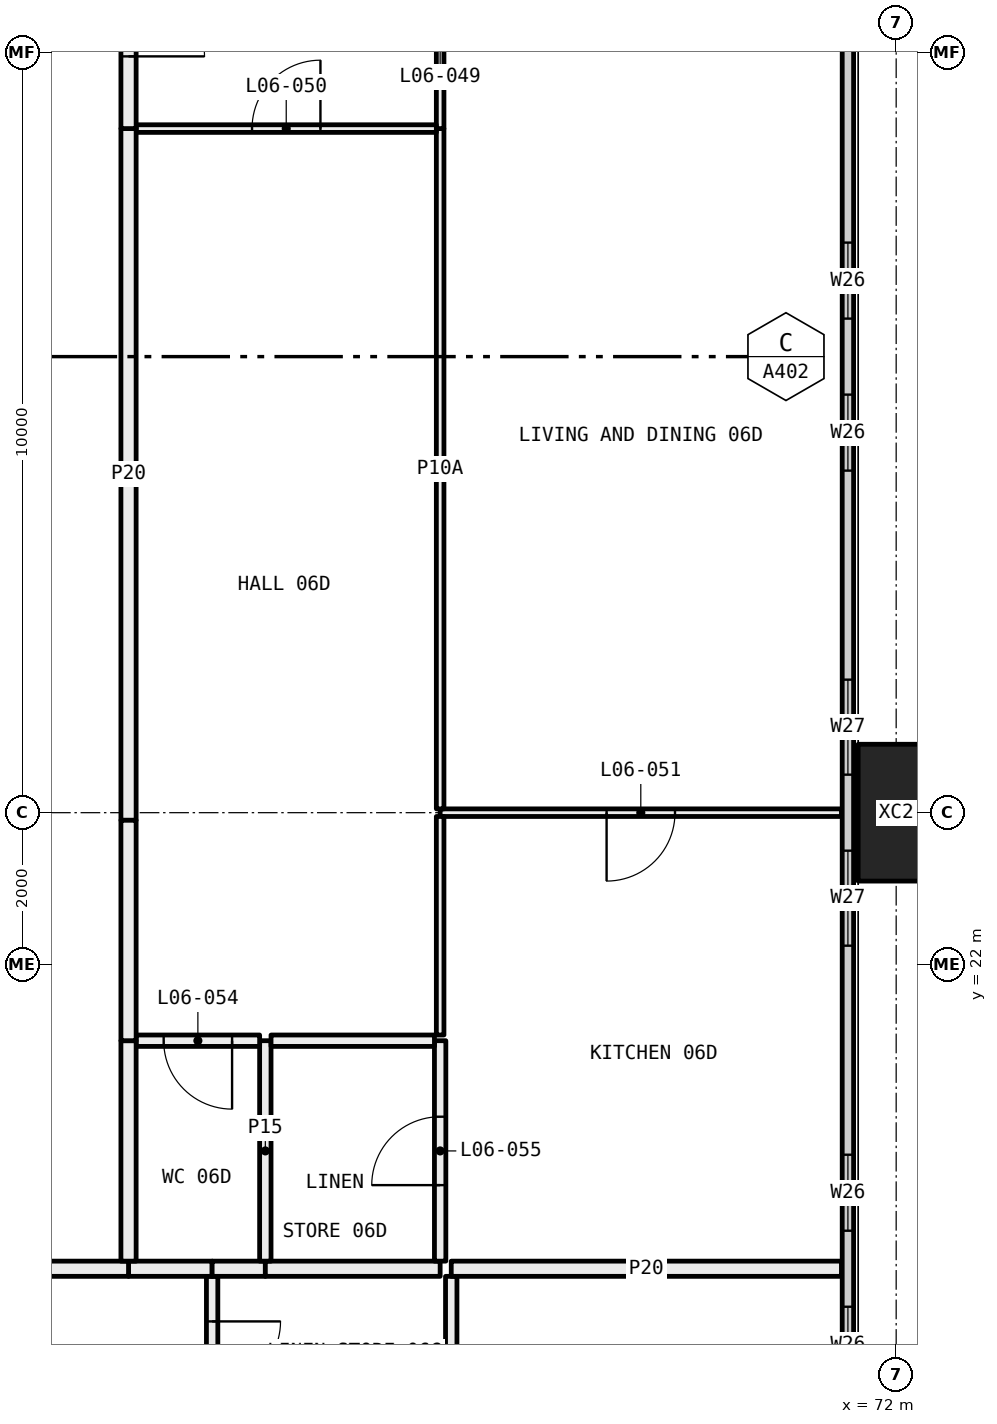
"""IFC4 building model, lengths in metres.
Left out: names, types, materials, properties, quantities, classifications, styles, units other than length and angle.
Written with IfcOpenShell. Run it as: python <this file> out.ifc"""

import sys

from ifc_helpers import new_model, si_unit, direction, frame, frame_2d, origin, origin_2d, place, context, subcontext, project, spatial, rectangle, hollow_rectangle, extrude, element, fill, save


model = new_model("IFC4")
c1 = context("Model", 3, precision=1e-05, world=origin(), true_north=direction((0.0, 1.0)))
c2 = subcontext(c1, "Body", "Model", "MODEL_VIEW")
j1 = project(units=[si_unit("LENGTHUNIT", "METRE"), si_unit("PLANEANGLEUNIT", "RADIAN")], contexts=[c1])
p1 = place(None, origin())
s1 = spatial("IfcSite", under=j1, at=p1, CompositionType="ELEMENT")
p2 = place(p1, origin())
s2 = spatial("IfcBuilding", under=s1, at=p2, CompositionType="ELEMENT")
p3 = place(p2, frame((0.0, 0.0, 33.45)))
s3 = spatial("IfcBuildingStorey", under=s2, at=p3, CompositionType="ELEMENT", Elevation=33.45)
p4 = place(p3, frame((72.0, 24.0, -0.4), z_axis=(0.0, 0.0, 1.0), x_axis=(0.0, 1.0, 0.0)))
e1 = element("IfcColumn", 1, at=p4, inside=s3, PredefinedType="COLUMN", context=c2, shape_type="SweptSolid", body=[
    extrude(hollow_rectangle(XDim=1.8, YDim=1.0, WallThickness=0.07, at=origin_2d()), origin(), (0.0, 0.0, 1.0), 3.45),
])
p5 = place(p3, frame((71.365, 6.71, 0.0), z_axis=(0.0, 0.0, 1.0), x_axis=(0.0, 1.0, 0.0)))
e2 = element("IfcWall", 2, at=p5, inside=s3, PredefinedType="ELEMENTEDWALL", context=c2, shape_type="SweptSolid", body=[
    extrude(rectangle(XDim=34.58, YDim=0.15, at=frame_2d((17.29, 0.0))), origin(), (0.0, 0.0, 1.0), 3.05),
])
p6 = place(p5, frame((0.29, 0.0, 0.45)))
e3 = element("IfcOpeningElement", 3, at=p6, cuts=e2, PredefinedType="OPENING", context=c2, shape_type="SweptSolid", body=[
    extrude(rectangle(XDim=4.5, YDim=2.55, at=frame_2d((2.25, 1.275))), frame((0.0, 0.085, 0.0), z_axis=(0.0, -1.0, 0.0), x_axis=(1.0, 0.0, 0.0)), (0.0, 0.0, 1.0), 0.17),
])
p7 = place(p5, frame((5.79, 0.0, 0.45)))
e4 = element("IfcOpeningElement", 4, at=p7, cuts=e2, PredefinedType="OPENING", context=c2, shape_type="SweptSolid", body=[
    extrude(rectangle(XDim=1.25, YDim=2.55, at=frame_2d((0.625, 1.275))), frame((0.0, 0.085, 0.0), z_axis=(0.0, -1.0, 0.0), x_axis=(1.0, 0.0, 0.0)), (0.0, 0.0, 1.0), 0.17),
])
p8 = place(p5, frame((9.79, 0.0, 0.45)))
e5 = element("IfcOpeningElement", 5, at=p8, cuts=e2, PredefinedType="OPENING", context=c2, shape_type="SweptSolid", body=[
    extrude(rectangle(XDim=1.0, YDim=2.55, at=frame_2d((0.5, 1.275))), frame((0.0, 0.085, 0.0), z_axis=(0.0, -1.0, 0.0), x_axis=(1.0, 0.0, 0.0)), (0.0, 0.0, 1.0), 0.17),
])
p9 = place(p5, frame((11.79, 0.0, 0.45)))
e6 = element("IfcOpeningElement", 6, at=p9, cuts=e2, PredefinedType="OPENING", context=c2, shape_type="SweptSolid", body=[
    extrude(rectangle(XDim=1.0, YDim=2.55, at=frame_2d((0.5, 1.275))), frame((0.0, 0.085, 0.0), z_axis=(0.0, -1.0, 0.0), x_axis=(1.0, 0.0, 0.0)), (0.0, 0.0, 1.0), 0.17),
])
p10 = place(p5, frame((15.54, 0.0, 0.45)))
e7 = element("IfcOpeningElement", 7, at=p10, cuts=e2, PredefinedType="OPENING", context=c2, shape_type="SweptSolid", body=[
    extrude(rectangle(XDim=1.25, YDim=2.55, at=frame_2d((0.625, 1.275))), frame((0.0, 0.085, 0.0), z_axis=(0.0, -1.0, 0.0), x_axis=(1.0, 0.0, 0.0)), (0.0, 0.0, 1.0), 0.17),
])
p11 = place(p5, frame((17.79, 0.0, 0.45)))
e8 = element("IfcOpeningElement", 8, at=p11, cuts=e2, PredefinedType="OPENING", context=c2, shape_type="SweptSolid", body=[
    extrude(rectangle(XDim=1.25, YDim=2.55, at=frame_2d((0.625, 1.275))), frame((0.0, 0.085, 0.0), z_axis=(0.0, -1.0, 0.0), x_axis=(1.0, 0.0, 0.0)), (0.0, 0.0, 1.0), 0.17),
])
p12 = place(p5, frame((21.79, 0.0, 0.45)))
e9 = element("IfcOpeningElement", 9, at=p12, cuts=e2, PredefinedType="OPENING", context=c2, shape_type="SweptSolid", body=[
    extrude(rectangle(XDim=1.0, YDim=2.55, at=frame_2d((0.5, 1.275))), frame((0.0, 0.085, 0.0), z_axis=(0.0, -1.0, 0.0), x_axis=(1.0, 0.0, 0.0)), (0.0, 0.0, 1.0), 0.17),
])
p13 = place(p5, frame((23.79, 0.0, 0.45)))
e10 = element("IfcOpeningElement", 10, at=p13, cuts=e2, PredefinedType="OPENING", context=c2, shape_type="SweptSolid", body=[
    extrude(rectangle(XDim=1.0, YDim=2.55, at=frame_2d((0.5, 1.275))), frame((0.0, 0.085, 0.0), z_axis=(0.0, -1.0, 0.0), x_axis=(1.0, 0.0, 0.0)), (0.0, 0.0, 1.0), 0.17),
])
p14 = place(p5, frame((27.54, 0.0, 0.45)))
e11 = element("IfcOpeningElement", 11, at=p14, cuts=e2, PredefinedType="OPENING", context=c2, shape_type="SweptSolid", body=[
    extrude(rectangle(XDim=1.25, YDim=2.55, at=frame_2d((0.625, 1.275))), frame((0.0, 0.085, 0.0), z_axis=(0.0, -1.0, 0.0), x_axis=(1.0, 0.0, 0.0)), (0.0, 0.0, 1.0), 0.17),
])
p15 = place(p5, frame((29.79, 0.0, 0.45)))
e12 = element("IfcOpeningElement", 12, at=p15, cuts=e2, PredefinedType="OPENING", context=c2, shape_type="SweptSolid", body=[
    extrude(rectangle(XDim=4.5, YDim=2.55, at=frame_2d((2.25, 1.275))), frame((0.0, 0.085, 0.0), z_axis=(0.0, -1.0, 0.0), x_axis=(1.0, 0.0, 0.0)), (0.0, 0.0, 1.0), 0.17),
])
p16 = place(p3, frame((63.0, 15.814, 0.0), z_axis=(0.0, 0.0, 1.0), x_axis=(0.0, 1.0, 0.0)))
e13 = element("IfcWall", 13, at=p16, inside=s3, PredefinedType="PARTITIONING", context=c2, shape_type="SweptSolid", body=[
    extrude(rectangle(XDim=2.086, YDim=0.15, at=frame_2d((1.043, 0.0))), origin(), (0.0, 0.0, 1.0), 3.05),
])
p17 = place(p16, frame((0.593, 0.0, 0.0)))
e14 = element("IfcOpeningElement", 14, at=p17, cuts=e13, PredefinedType="OPENING", context=c2, shape_type="SweptSolid", body=[
    extrude(rectangle(XDim=0.9, YDim=2.1, at=frame_2d((0.45, 1.05))), frame((0.0, 0.085, 0.0), z_axis=(0.0, -1.0, 0.0), x_axis=(1.0, 0.0, 0.0)), (0.0, 0.0, 1.0), 0.17),
])
p18 = place(p3, frame((63.0, 18.0, 0.0), z_axis=(0.0, 0.0, 1.0), x_axis=(-1.0, 0.0, 0.0)))
e15 = element("IfcWall", 15, at=p18, inside=s3, PredefinedType="PARTITIONING", context=c2, shape_type="SweptSolid", body=[
    extrude(rectangle(XDim=1.1, YDim=0.2, at=frame_2d((0.55, 0.0))), origin(), (0.0, 0.0, 1.0), 3.05),
])
p19 = place(p3, frame((61.9, 18.0, 0.0), z_axis=(0.0, 0.0, 1.0), x_axis=(-1.0, 0.0, 0.0)))
e16 = element("IfcWall", 16, at=p19, inside=s3, PredefinedType="PARTITIONING", context=c2, shape_type="SweptSolid", body=[
    extrude(rectangle(XDim=1.9, YDim=0.2, at=frame_2d((0.95, 0.0))), origin(), (0.0, 0.0, 1.0), 3.05),
])
p20 = place(p3, frame((66.146, 17.9, 0.0), z_axis=(0.0, 0.0, 1.0), x_axis=(0.0, -1.0, 0.0)))
e17 = element("IfcWall", 17, at=p20, inside=s3, PredefinedType="PARTITIONING", context=c2, shape_type="SweptSolid", body=[
    extrude(rectangle(XDim=2.086, YDim=0.15, at=frame_2d((1.043, 0.0))), origin(), (0.0, 0.0, 1.0), 2.55),
])
p21 = place(p3, frame((71.28, 18.0, 0.0), z_axis=(0.0, 0.0, 1.0), x_axis=(-1.0, 0.0, 0.0)))
e18 = element("IfcWall", 18, at=p21, inside=s3, PredefinedType="PARTITIONING", context=c2, shape_type="SweptSolid", body=[
    extrude(rectangle(XDim=5.134, YDim=0.2, at=frame_2d((2.567, 0.0))), origin(), (0.0, 0.0, 1.0), 3.05),
])
p22 = place(p3, frame((63.7, 18.0, 0.0), z_axis=(0.0, 0.0, 1.0), x_axis=(-1.0, 0.0, 0.0)))
e19 = element("IfcWall", 19, at=p22, inside=s3, PredefinedType="PARTITIONING", context=c2, shape_type="SweptSolid", body=[
    extrude(rectangle(XDim=0.7, YDim=0.2, at=frame_2d((0.35, 0.0))), origin(), (0.0, 0.0, 1.0), 3.05),
])
p23 = place(p3, frame((66.0, 18.0, 0.0), z_axis=(0.0, 0.0, 1.0), x_axis=(-1.0, 0.0, 0.0)))
e20 = element("IfcWall", 20, at=p23, inside=s3, PredefinedType="PARTITIONING", context=c2, shape_type="SweptSolid", body=[
    extrude(rectangle(XDim=2.3, YDim=0.2, at=frame_2d((1.15, 0.0))), origin(), (0.0, 0.0, 1.0), 3.05),
])
p24 = place(p3, frame((71.28, 24.0, 0.0), z_axis=(0.0, 0.0, 1.0), x_axis=(-1.0, 0.0, 0.0)))
e21 = element("IfcWall", 21, at=p24, inside=s3, PredefinedType="PARTITIONING", context=c2, shape_type="SweptSolid", body=[
    extrude(rectangle(XDim=5.28, YDim=0.1, at=frame_2d((2.64, 0.0))), origin(), (0.0, 0.0, 1.0), 2.45),
])
p25 = place(p24, frame((2.19, 0.0, 0.0)))
e22 = element("IfcOpeningElement", 22, at=p25, cuts=e21, PredefinedType="OPENING", context=c2, shape_type="SweptSolid", body=[
    extrude(rectangle(XDim=0.9, YDim=2.1, at=frame_2d((0.45, 1.05))), frame((0.0, 0.06, 0.0), z_axis=(0.0, -1.0, 0.0), x_axis=(1.0, 0.0, 0.0)), (0.0, 0.0, 1.0), 0.12),
])
p26 = place(p3, frame((66.0, 21.0, 0.0), z_axis=(0.0, 0.0, 1.0), x_axis=(0.0, -1.0, 0.0)))
e23 = element("IfcWall", 23, at=p26, inside=s3, PredefinedType="PARTITIONING", context=c2, shape_type="SweptSolid", body=[
    extrude(rectangle(XDim=2.9, YDim=0.15, at=frame_2d((1.45, 0.0))), origin(), (0.0, 0.0, 1.0), 3.05),
])
p27 = place(p26, frame((1.0, 0.0, 0.0)))
e24 = element("IfcOpeningElement", 24, at=p27, cuts=e23, PredefinedType="OPENING", context=c2, shape_type="SweptSolid", body=[
    extrude(rectangle(XDim=0.9, YDim=2.1, at=frame_2d((0.45, 1.05))), frame((0.0, 0.085, 0.0), z_axis=(0.0, -1.0, 0.0), x_axis=(1.0, 0.0, 0.0)), (0.0, 0.0, 1.0), 0.17),
])
p28 = place(p3, frame((66.0, 23.95, 0.0), z_axis=(0.0, 0.0, 1.0), x_axis=(0.0, -1.0, 0.0)))
e25 = element("IfcWall", 25, at=p28, inside=s3, PredefinedType="PARTITIONING", context=c2, shape_type="SweptSolid", body=[
    extrude(rectangle(XDim=2.875, YDim=0.1, at=frame_2d((1.438, 0.0))), origin(), (0.0, 0.0, 1.0), 2.45),
])
p29 = place(p3, frame((66.0, 33.0, 0.0), z_axis=(0.0, 0.0, 1.0), x_axis=(0.0, -1.0, 0.0)))
e26 = element("IfcWall", 26, at=p29, inside=s3, PredefinedType="PARTITIONING", context=c2, shape_type="SweptSolid", body=[
    extrude(rectangle(XDim=8.95, YDim=0.1, at=frame_2d((4.475, 0.0))), origin(), (0.0, 0.0, 1.0), 2.45),
])
p30 = place(p3, frame((66.0, 35.95, 0.0), z_axis=(0.0, 0.0, 1.0), x_axis=(0.0, -1.0, 0.0)))
e27 = element("IfcWall", 27, at=p30, inside=s3, PredefinedType="PARTITIONING", context=c2, shape_type="SweptSolid", body=[
    extrude(rectangle(XDim=2.95, YDim=0.1, at=frame_2d((1.475, 0.0))), origin(), (0.0, 0.0, 1.0), 2.45),
])
p31 = place(p30, frame((1.025, 0.0, 0.0)))
e28 = element("IfcOpeningElement", 28, at=p31, cuts=e27, PredefinedType="OPENING", context=c2, shape_type="SweptSolid", body=[
    extrude(rectangle(XDim=0.9, YDim=2.1, at=frame_2d((0.45, 1.05))), frame((0.0, 0.06, 0.0), z_axis=(0.0, -1.0, 0.0), x_axis=(1.0, 0.0, 0.0)), (0.0, 0.0, 1.0), 0.12),
])
p32 = place(p3, frame((63.7, 18.1, 0.0), z_axis=(0.0, 0.0, 1.0), x_axis=(0.0, 1.0, 0.0)))
e29 = element("IfcWall", 29, at=p32, inside=s3, PredefinedType="PARTITIONING", context=c2, shape_type="SweptSolid", body=[
    extrude(rectangle(XDim=2.9, YDim=0.15, at=frame_2d((1.45, 0.0))), origin(), (0.0, 0.0, 1.0), 3.05),
])
p33 = place(p3, frame((63.625, 21.0, 0.0), z_axis=(0.0, 0.0, 1.0), x_axis=(-1.0, 0.0, 0.0)))
e30 = element("IfcWall", 30, at=p33, inside=s3, PredefinedType="PARTITIONING", context=c2, shape_type="SweptSolid", body=[
    extrude(rectangle(XDim=1.625, YDim=0.15, at=frame_2d((0.812, 0.0))), origin(), (0.0, 0.0, 1.0), 3.05),
])
p34 = place(p33, frame((0.363, 0.0, 0.0)))
e31 = element("IfcOpeningElement", 31, at=p34, cuts=e30, PredefinedType="OPENING", context=c2, shape_type="SweptSolid", body=[
    extrude(rectangle(XDim=0.9, YDim=2.1, at=frame_2d((0.45, 1.05))), frame((0.0, 0.085, 0.0), z_axis=(0.0, -1.0, 0.0), x_axis=(1.0, 0.0, 0.0)), (0.0, 0.0, 1.0), 0.17),
])
p35 = place(p3, frame((61.9, 21.0, 0.0), z_axis=(0.0, 0.0, 1.0), x_axis=(0.0, -1.0, 0.0)))
e32 = element("IfcWall", 32, at=p35, inside=s3, PredefinedType="PARTITIONING", context=c2, shape_type="SweptSolid", body=[
    extrude(rectangle(XDim=2.9, YDim=0.2, at=frame_2d((1.45, 0.0))), origin(), (0.0, 0.0, 1.0), 3.05),
])
p36 = place(p3, frame((65.925, 21.0, 0.0), z_axis=(0.0, 0.0, 1.0), x_axis=(-1.0, 0.0, 0.0)))
e33 = element("IfcWall", 33, at=p36, inside=s3, PredefinedType="PARTITIONING", context=c2, shape_type="SweptSolid", body=[
    extrude(rectangle(XDim=2.15, YDim=0.15, at=frame_2d((1.075, 0.0))), origin(), (0.0, 0.0, 1.0), 3.05),
])
p37 = place(p3, frame((65.95, 33.0, 0.0), z_axis=(0.0, 0.0, 1.0), x_axis=(-1.0, 0.0, 0.0)))
e34 = element("IfcWall", 34, at=p37, inside=s3, PredefinedType="PARTITIONING", context=c2, shape_type="SweptSolid", body=[
    extrude(rectangle(XDim=3.95, YDim=0.1, at=frame_2d((1.975, 0.0))), origin(), (0.0, 0.0, 1.0), 3.05),
])
p38 = place(p37, frame((1.525, 0.0, 0.0)))
e35 = element("IfcOpeningElement", 35, at=p38, cuts=e34, PredefinedType="OPENING", context=c2, shape_type="SweptSolid", body=[
    extrude(rectangle(XDim=0.9, YDim=2.1, at=frame_2d((0.45, 1.05))), frame((0.0, 0.06, 0.0), z_axis=(0.0, -1.0, 0.0), x_axis=(1.0, 0.0, 0.0)), (0.0, 0.0, 1.0), 0.12),
])
p39 = place(p3, frame((61.9, 33.0, 0.0), z_axis=(0.0, 0.0, 1.0), x_axis=(0.0, -1.0, 0.0)))
e36 = element("IfcWall", 36, at=p39, inside=s3, PredefinedType="PARTITIONING", context=c2, shape_type="SweptSolid", body=[
    extrude(rectangle(XDim=9.1, YDim=0.2, at=frame_2d((4.55, 0.0))), origin(), (0.0, 0.0, 1.0), 2.45),
])
p40 = place(p3, frame((61.9, 23.9, 0.0), z_axis=(0.0, 0.0, 1.0), x_axis=(0.0, -1.0, 0.0)))
e37 = element("IfcWall", 37, at=p40, inside=s3, PredefinedType="PARTITIONING", context=c2, shape_type="SweptSolid", body=[
    extrude(rectangle(XDim=2.9, YDim=0.2, at=frame_2d((1.45, 0.0))), origin(), (0.0, 0.0, 1.0), 3.05),
])
p41 = place(p3, frame((61.9, 35.9, 0.0), z_axis=(0.0, 0.0, 1.0), x_axis=(0.0, -1.0, 0.0)))
e38 = element("IfcWall", 38, at=p41, inside=s3, PredefinedType="PARTITIONING", context=c2, shape_type="SweptSolid", body=[
    extrude(rectangle(XDim=2.9, YDim=0.2, at=frame_2d((1.45, 0.0))), origin(), (0.0, 0.0, 1.0), 3.05),
])
p42 = place(p41, frame((0.95, 0.0, 0.0)))
e39 = element("IfcOpeningElement", 39, at=p42, cuts=e38, PredefinedType="OPENING", context=c2, shape_type="SweptSolid", body=[
    extrude(rectangle(XDim=1.0, YDim=2.1, at=frame_2d((0.5, 1.05))), frame((0.0, 0.11, 0.0), z_axis=(0.0, -1.0, 0.0), x_axis=(1.0, 0.0, 0.0)), (0.0, 0.0, 1.0), 0.22),
])
p43 = place(p8, origin())
e40 = element("IfcWindow", 40, at=p43, inside=s3, PartitioningType="SINGLE_PANEL", PredefinedType="WINDOW", context=c2, shape_type="SweptSolid", body=[
    extrude(rectangle(XDim=1.0, YDim=2.55, at=frame_2d((0.5, 1.275))), frame((0.0, 0.03, 0.0), z_axis=(0.0, -1.0, 0.0), x_axis=(1.0, 0.0, 0.0)), (0.0, 0.0, 1.0), 0.06),
])
fill(e5, e40)
p44 = place(p9, origin())
e41 = element("IfcWindow", 41, at=p44, inside=s3, PartitioningType="SINGLE_PANEL", PredefinedType="WINDOW", context=c2, shape_type="SweptSolid", body=[
    extrude(rectangle(XDim=1.0, YDim=2.55, at=frame_2d((0.5, 1.275))), frame((0.0, 0.03, 0.0), z_axis=(0.0, -1.0, 0.0), x_axis=(1.0, 0.0, 0.0)), (0.0, 0.0, 1.0), 0.06),
])
fill(e6, e41)
p45 = place(p10, origin())
e42 = element("IfcWindow", 42, at=p45, inside=s3, PartitioningType="SINGLE_PANEL", PredefinedType="WINDOW", context=c2, shape_type="SweptSolid", body=[
    extrude(rectangle(XDim=1.25, YDim=2.55, at=frame_2d((0.625, 1.275))), frame((0.0, 0.03, 0.0), z_axis=(0.0, -1.0, 0.0), x_axis=(1.0, 0.0, 0.0)), (0.0, 0.0, 1.0), 0.06),
])
fill(e7, e42)
p46 = place(p11, origin())
e43 = element("IfcWindow", 43, at=p46, inside=s3, PartitioningType="SINGLE_PANEL", PredefinedType="WINDOW", context=c2, shape_type="SweptSolid", body=[
    extrude(rectangle(XDim=1.25, YDim=2.55, at=frame_2d((0.625, 1.275))), frame((0.0, 0.03, 0.0), z_axis=(0.0, -1.0, 0.0), x_axis=(1.0, 0.0, 0.0)), (0.0, 0.0, 1.0), 0.06),
])
fill(e8, e43)
p47 = place(p12, origin())
e44 = element("IfcWindow", 44, at=p47, inside=s3, PartitioningType="SINGLE_PANEL", PredefinedType="WINDOW", context=c2, shape_type="SweptSolid", body=[
    extrude(rectangle(XDim=1.0, YDim=2.55, at=frame_2d((0.5, 1.275))), frame((0.0, 0.03, 0.0), z_axis=(0.0, -1.0, 0.0), x_axis=(1.0, 0.0, 0.0)), (0.0, 0.0, 1.0), 0.06),
])
fill(e9, e44)
p48 = place(p13, origin())
e45 = element("IfcWindow", 45, at=p48, inside=s3, PartitioningType="SINGLE_PANEL", PredefinedType="WINDOW", context=c2, shape_type="SweptSolid", body=[
    extrude(rectangle(XDim=1.0, YDim=2.55, at=frame_2d((0.5, 1.275))), frame((0.0, 0.03, 0.0), z_axis=(0.0, -1.0, 0.0), x_axis=(1.0, 0.0, 0.0)), (0.0, 0.0, 1.0), 0.06),
])
fill(e10, e45)
p49 = place(p17, frame((0.9, 0.0, 0.0), x_axis=(-1.0, 0.0, 0.0)))
e46 = element("IfcDoor", 46, at=p49, inside=s3, OperationType="SINGLE_SWING_RIGHT", PredefinedType="DOOR", context=c2, shape_type="SweptSolid", body=[
    extrude(rectangle(XDim=0.9, YDim=2.1, at=frame_2d((0.45, 1.05))), frame((0.0, 0.025, 0.0), z_axis=(0.0, -1.0, 0.0), x_axis=(1.0, 0.0, 0.0)), (0.0, 0.0, 1.0), 0.05),
])
fill(e14, e46)
p50 = place(p42, origin())
e47 = element("IfcDoor", 47, at=p50, inside=s3, OperationType="SINGLE_SWING_LEFT", PredefinedType="DOOR", context=c2, shape_type="SweptSolid", body=[
    extrude(rectangle(XDim=1.0, YDim=2.1, at=frame_2d((0.5, 1.05))), frame((0.0, 0.025, 0.0), z_axis=(0.0, -1.0, 0.0), x_axis=(1.0, 0.0, 0.0)), (0.0, 0.0, 1.0), 0.05),
])
fill(e39, e47)
p51 = place(p38, frame((0.9, 0.0, 0.0), x_axis=(-1.0, 0.0, 0.0)))
e48 = element("IfcDoor", 48, at=p51, inside=s3, OperationType="SINGLE_SWING_LEFT", PredefinedType="DOOR", context=c2, shape_type="SweptSolid", body=[
    extrude(rectangle(XDim=0.9, YDim=2.1, at=frame_2d((0.45, 1.05))), frame((0.0, 0.025, 0.0), z_axis=(0.0, -1.0, 0.0), x_axis=(1.0, 0.0, 0.0)), (0.0, 0.0, 1.0), 0.05),
])
fill(e35, e48)
p52 = place(p25, origin())
e49 = element("IfcDoor", 49, at=p52, inside=s3, OperationType="SINGLE_SWING_LEFT", PredefinedType="DOOR", context=c2, shape_type="SweptSolid", body=[
    extrude(rectangle(XDim=0.9, YDim=2.1, at=frame_2d((0.45, 1.05))), frame((0.0, 0.025, 0.0), z_axis=(0.0, -1.0, 0.0), x_axis=(1.0, 0.0, 0.0)), (0.0, 0.0, 1.0), 0.05),
])
fill(e22, e49)
p53 = place(p34, origin())
e50 = element("IfcDoor", 50, at=p53, inside=s3, OperationType="SINGLE_SWING_RIGHT", PredefinedType="DOOR", context=c2, shape_type="SweptSolid", body=[
    extrude(rectangle(XDim=0.9, YDim=2.1, at=frame_2d((0.45, 1.05))), frame((0.0, 0.025, 0.0), z_axis=(0.0, -1.0, 0.0), x_axis=(1.0, 0.0, 0.0)), (0.0, 0.0, 1.0), 0.05),
])
fill(e31, e50)
p54 = place(p27, frame((0.9, 0.0, 0.0), x_axis=(-1.0, 0.0, 0.0)))
e51 = element("IfcDoor", 51, at=p54, inside=s3, OperationType="SINGLE_SWING_RIGHT", PredefinedType="DOOR", context=c2, shape_type="SweptSolid", body=[
    extrude(rectangle(XDim=0.9, YDim=2.1, at=frame_2d((0.45, 1.05))), frame((0.0, 0.025, 0.0), z_axis=(0.0, -1.0, 0.0), x_axis=(1.0, 0.0, 0.0)), (0.0, 0.0, 1.0), 0.05),
])
fill(e24, e51)
save(model, sys.argv[1])
